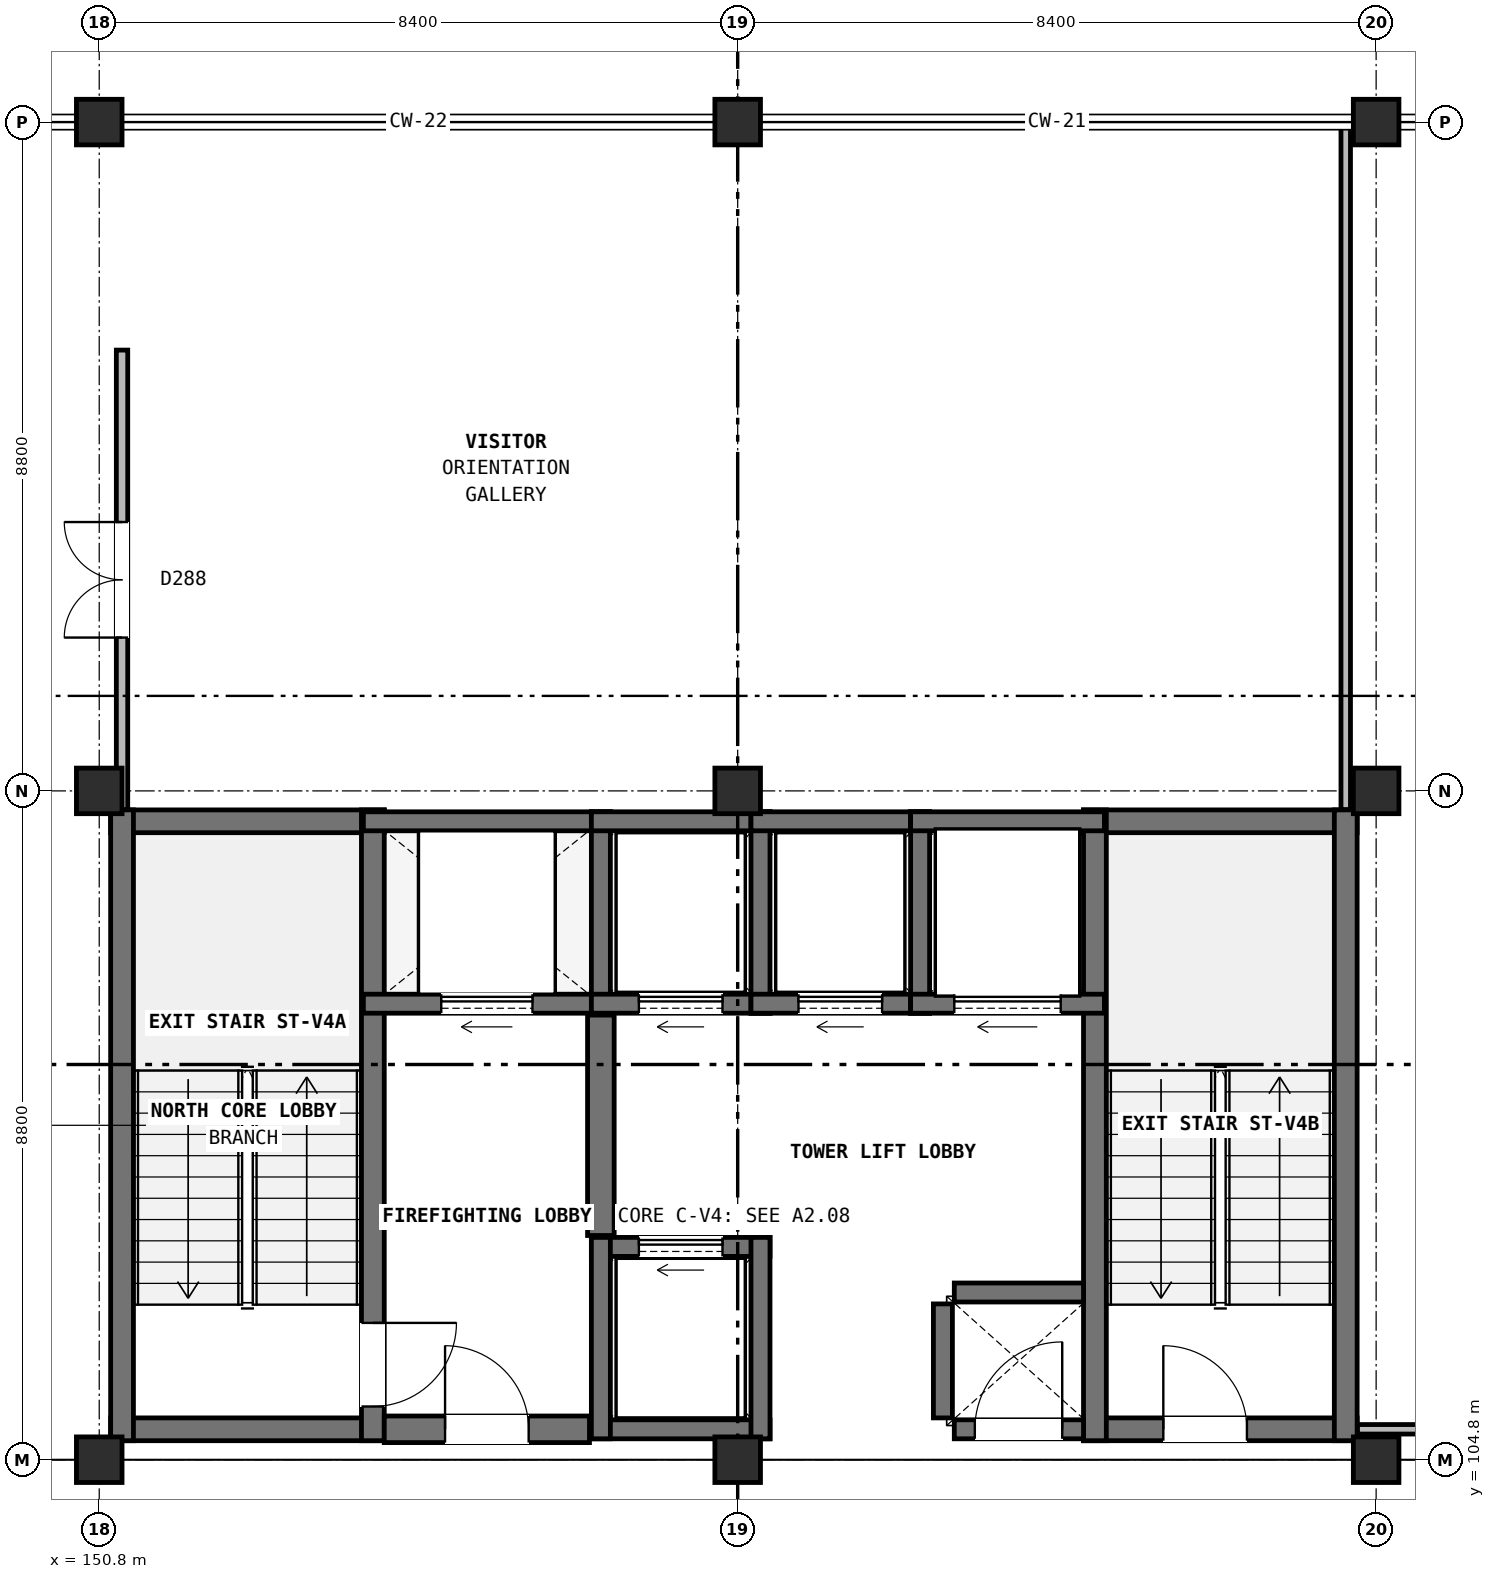
"""IFC4 building model, lengths in metres.
Left out: names, types, materials, properties, quantities, classifications, styles, units other than length and angle.
Written with IfcOpenShell. Run it as: python <this file> out.ifc"""

import sys

from ifc_helpers import new_model, si_unit, direction, frame, frame_2d, origin, origin_2d, place, context, subcontext, project, spatial, rectangle, extrude, element, fill, save


model = new_model("IFC4")
c1 = context("Model", 3, precision=1e-05, world=origin(), true_north=direction((0.0, 1.0)))
c2 = subcontext(c1, "Body", "Model", "MODEL_VIEW")
j1 = project(units=[si_unit("LENGTHUNIT", "METRE"), si_unit("PLANEANGLEUNIT", "RADIAN")], contexts=[c1])
p1 = place(None, origin())
s1 = spatial("IfcSite", under=j1, at=p1, CompositionType="ELEMENT")
p2 = place(p1, origin())
s2 = spatial("IfcBuilding", under=s1, at=p2, CompositionType="ELEMENT")
p3 = place(p2, frame((0.0, 0.0, 63.8)))
s3 = spatial("IfcBuildingStorey", under=s2, at=p3, CompositionType="ELEMENT", Elevation=63.8)
for number, where, z_axis, x_axis in (
    (1, (150.8, 104.8, 0.0), (0.0, 0.0, 1.0), (1.0, 0.0, 0.0)),
    (2, (150.8, 113.6, 0.0), (0.0, 0.0, 1.0), (1.0, 0.0, 0.0)),
    (3, (150.8, 122.4, 0.0), (0.0, 0.0, 1.0), (1.0, 0.0, 0.0)),
    (4, (159.2, 104.8, 0.0), (0.0, 0.0, 1.0), (1.0, 0.0, 0.0)),
    (5, (159.2, 113.6, 0.0), (0.0, 0.0, 1.0), (1.0, 0.0, 0.0)),
    (6, (159.2, 122.4, 0.0), (0.0, 0.0, 1.0), (1.0, 0.0, 0.0)),
    (7, (167.6, 104.8, 0.0), (0.0, 0.0, 1.0), (1.0, 0.0, 0.0)),
    (8, (167.6, 113.6, 0.0), (0.0, 0.0, 1.0), (1.0, 0.0, 0.0)),
    (9, (167.6, 122.4, 0.0), (0.0, 0.0, 1.0), (1.0, 0.0, 0.0)),
):
    element("IfcColumn", number, at=place(p3, frame(where, z_axis=z_axis, x_axis=x_axis)), inside=s3, PredefinedType="COLUMN", context=c2, shape_type="SweptSolid", body=[
        extrude(rectangle(XDim=0.6, YDim=0.6, at=origin_2d()), origin(), (0.0, 0.0, 1.0), 4.2),
    ])
for number, where, z_axis, x_axis in (
    (10, (150.95, 105.2, 0.0), (0.0, 0.0, 1.0), (1.0, 0.0, 0.0)),
    (11, (150.95, 113.2, 0.0), (0.0, 0.0, 1.0), (1.0, 0.0, 0.0)),
):
    element("IfcWall", number, at=place(p3, frame(where, z_axis=z_axis, x_axis=x_axis)), inside=s3, PredefinedType="SHEAR", context=c2, shape_type="SweptSolid", body=[
        extrude(rectangle(XDim=3.6, YDim=0.3, at=frame_2d((1.8, 0.0))), origin(), (0.0, 0.0, 1.0), 4.2),
    ])
p4 = place(p3, frame((151.1, 105.05, 0.0), z_axis=(0.0, 0.0, 1.0), x_axis=(0.0, 1.0, 0.0)))
e12 = element("IfcWall", 12, at=p4, inside=s3, PredefinedType="SHEAR", context=c2, shape_type="SweptSolid", body=[
    extrude(rectangle(XDim=8.3, YDim=0.3, at=frame_2d((4.15, 0.0))), origin(), (0.0, 0.0, 1.0), 4.2),
])
p5 = place(p3, frame((154.4, 105.05, 0.0), z_axis=(0.0, 0.0, 1.0), x_axis=(0.0, 1.0, 0.0)))
e13 = element("IfcWall", 13, at=p5, inside=s3, PredefinedType="SHEAR", context=c2, shape_type="SweptSolid", body=[
    extrude(rectangle(XDim=8.3, YDim=0.3, at=frame_2d((4.15, 0.0))), origin(), (0.0, 0.0, 1.0), 4.2),
])
p6 = place(p5, frame((0.45, 0.0, 0.0)))
e14 = element("IfcOpeningElement", 14, at=p6, cuts=e13, PredefinedType="OPENING", context=c2, shape_type="SweptSolid", body=[
    extrude(rectangle(XDim=1.1, YDim=2.2, at=frame_2d((0.55, 1.1))), frame((0.0, 0.16, 0.0), z_axis=(0.0, -1.0, 0.0), x_axis=(1.0, 0.0, 0.0)), (0.0, 0.0, 1.0), 0.32),
])
p7 = place(p3, frame((163.75, 105.2, 0.0), z_axis=(0.0, 0.0, 1.0), x_axis=(1.0, 0.0, 0.0)))
e15 = element("IfcWall", 15, at=p7, inside=s3, PredefinedType="SHEAR", context=c2, shape_type="SweptSolid", body=[
    extrude(rectangle(XDim=3.6, YDim=0.3, at=frame_2d((1.8, 0.0))), origin(), (0.0, 0.0, 1.0), 4.2),
])
p8 = place(p7, frame((1.05, 0.0, 0.0)))
e16 = element("IfcOpeningElement", 16, at=p8, cuts=e15, PredefinedType="OPENING", context=c2, shape_type="SweptSolid", body=[
    extrude(rectangle(XDim=1.1, YDim=2.2, at=frame_2d((0.55, 1.1))), frame((0.0, 0.16, 0.0), z_axis=(0.0, -1.0, 0.0), x_axis=(1.0, 0.0, 0.0)), (0.0, 0.0, 1.0), 0.32),
])
p9 = place(p3, frame((163.75, 113.2, 0.0), z_axis=(0.0, 0.0, 1.0), x_axis=(1.0, 0.0, 0.0)))
e17 = element("IfcWall", 17, at=p9, inside=s3, PredefinedType="SHEAR", context=c2, shape_type="SweptSolid", body=[
    extrude(rectangle(XDim=3.6, YDim=0.3, at=frame_2d((1.8, 0.0))), origin(), (0.0, 0.0, 1.0), 4.2),
])
for number, where, z_axis, x_axis in (
    (18, (163.9, 105.05, 0.0), (0.0, 0.0, 1.0), (0.0, 1.0, 0.0)),
    (19, (167.2, 105.05, 0.0), (0.0, 0.0, 1.0), (0.0, 1.0, 0.0)),
):
    element("IfcWall", number, at=place(p3, frame(where, z_axis=z_axis, x_axis=x_axis)), inside=s3, PredefinedType="SHEAR", context=c2, shape_type="SweptSolid", body=[
        extrude(rectangle(XDim=8.3, YDim=0.3, at=frame_2d((4.15, 0.0))), origin(), (0.0, 0.0, 1.0), 4.2),
    ])
p10 = place(p3, frame((154.275, 110.8, 0.0), z_axis=(0.0, 0.0, 1.0), x_axis=(1.0, 0.0, 0.0)))
e20 = element("IfcWall", 20, at=p10, inside=s3, PredefinedType="SOLIDWALL", context=c2, shape_type="SweptSolid", body=[
    extrude(rectangle(XDim=3.25, YDim=0.25, at=frame_2d((1.625, 0.0))), origin(), (0.0, 0.0, 1.0), 3.88),
])
p11 = place(p10, frame((1.025, 0.0, 0.0)))
e21 = element("IfcOpeningElement", 21, at=p11, cuts=e20, PredefinedType="OPENING", context=c2, shape_type="SweptSolid", body=[
    extrude(rectangle(XDim=1.2, YDim=2.2, at=frame_2d((0.6, 1.1))), frame((0.0, 0.135, 0.0), z_axis=(0.0, -1.0, 0.0), x_axis=(1.0, 0.0, 0.0)), (0.0, 0.0, 1.0), 0.27),
])
p12 = place(p3, frame((154.275, 113.2, 0.0), z_axis=(0.0, 0.0, 1.0), x_axis=(1.0, 0.0, 0.0)))
e22 = element("IfcWall", 22, at=p12, inside=s3, PredefinedType="SOLIDWALL", context=c2, shape_type="SweptSolid", body=[
    extrude(rectangle(XDim=3.25, YDim=0.25, at=frame_2d((1.625, 0.0))), origin(), (0.0, 0.0, 1.0), 3.88),
])
p13 = place(p3, frame((157.4, 110.675, 0.0), z_axis=(0.0, 0.0, 1.0), x_axis=(0.0, 1.0, 0.0)))
e23 = element("IfcWall", 23, at=p13, inside=s3, PredefinedType="SOLIDWALL", context=c2, shape_type="SweptSolid", body=[
    extrude(rectangle(XDim=2.65, YDim=0.25, at=frame_2d((1.325, 0.0))), origin(), (0.0, 0.0, 1.0), 3.88),
])
p14 = place(p3, frame((157.275, 110.8, 0.0), z_axis=(0.0, 0.0, 1.0), x_axis=(1.0, 0.0, 0.0)))
e24 = element("IfcWall", 24, at=p14, inside=s3, PredefinedType="SOLIDWALL", context=c2, shape_type="SweptSolid", body=[
    extrude(rectangle(XDim=2.35, YDim=0.25, at=frame_2d((1.175, 0.0))), origin(), (0.0, 0.0, 1.0), 3.88),
])
p15 = place(p14, frame((0.625, 0.0, 0.0)))
e25 = element("IfcOpeningElement", 25, at=p15, cuts=e24, PredefinedType="OPENING", context=c2, shape_type="SweptSolid", body=[
    extrude(rectangle(XDim=1.1, YDim=2.2, at=frame_2d((0.55, 1.1))), frame((0.0, 0.135, 0.0), z_axis=(0.0, -1.0, 0.0), x_axis=(1.0, 0.0, 0.0)), (0.0, 0.0, 1.0), 0.27),
])
p16 = place(p3, frame((157.275, 113.2, 0.0), z_axis=(0.0, 0.0, 1.0), x_axis=(1.0, 0.0, 0.0)))
e26 = element("IfcWall", 26, at=p16, inside=s3, PredefinedType="SOLIDWALL", context=c2, shape_type="SweptSolid", body=[
    extrude(rectangle(XDim=2.35, YDim=0.25, at=frame_2d((1.175, 0.0))), origin(), (0.0, 0.0, 1.0), 3.88),
])
p17 = place(p3, frame((159.5, 110.675, 0.0), z_axis=(0.0, 0.0, 1.0), x_axis=(0.0, 1.0, 0.0)))
e27 = element("IfcWall", 27, at=p17, inside=s3, PredefinedType="SOLIDWALL", context=c2, shape_type="SweptSolid", body=[
    extrude(rectangle(XDim=2.65, YDim=0.25, at=frame_2d((1.325, 0.0))), origin(), (0.0, 0.0, 1.0), 3.88),
])
p18 = place(p3, frame((159.375, 110.8, 0.0), z_axis=(0.0, 0.0, 1.0), x_axis=(1.0, 0.0, 0.0)))
e28 = element("IfcWall", 28, at=p18, inside=s3, PredefinedType="SOLIDWALL", context=c2, shape_type="SweptSolid", body=[
    extrude(rectangle(XDim=2.35, YDim=0.25, at=frame_2d((1.175, 0.0))), origin(), (0.0, 0.0, 1.0), 3.88),
])
p19 = place(p18, frame((0.625, 0.0, 0.0)))
e29 = element("IfcOpeningElement", 29, at=p19, cuts=e28, PredefinedType="OPENING", context=c2, shape_type="SweptSolid", body=[
    extrude(rectangle(XDim=1.1, YDim=2.2, at=frame_2d((0.55, 1.1))), frame((0.0, 0.135, 0.0), z_axis=(0.0, -1.0, 0.0), x_axis=(1.0, 0.0, 0.0)), (0.0, 0.0, 1.0), 0.27),
])
p20 = place(p3, frame((159.375, 113.2, 0.0), z_axis=(0.0, 0.0, 1.0), x_axis=(1.0, 0.0, 0.0)))
e30 = element("IfcWall", 30, at=p20, inside=s3, PredefinedType="SOLIDWALL", context=c2, shape_type="SweptSolid", body=[
    extrude(rectangle(XDim=2.35, YDim=0.25, at=frame_2d((1.175, 0.0))), origin(), (0.0, 0.0, 1.0), 3.88),
])
p21 = place(p3, frame((161.6, 110.675, 0.0), z_axis=(0.0, 0.0, 1.0), x_axis=(0.0, 1.0, 0.0)))
e31 = element("IfcWall", 31, at=p21, inside=s3, PredefinedType="SOLIDWALL", context=c2, shape_type="SweptSolid", body=[
    extrude(rectangle(XDim=2.65, YDim=0.25, at=frame_2d((1.325, 0.0))), origin(), (0.0, 0.0, 1.0), 3.88),
])
p22 = place(p3, frame((157.275, 105.2, 0.0), z_axis=(0.0, 0.0, 1.0), x_axis=(1.0, 0.0, 0.0)))
e32 = element("IfcWall", 32, at=p22, inside=s3, PredefinedType="SOLIDWALL", context=c2, shape_type="SweptSolid", body=[
    extrude(rectangle(XDim=2.35, YDim=0.25, at=frame_2d((1.175, 0.0))), origin(), (0.0, 0.0, 1.0), 3.88),
])
p23 = place(p3, frame((157.275, 107.6, 0.0), z_axis=(0.0, 0.0, 1.0), x_axis=(1.0, 0.0, 0.0)))
e33 = element("IfcWall", 33, at=p23, inside=s3, PredefinedType="SOLIDWALL", context=c2, shape_type="SweptSolid", body=[
    extrude(rectangle(XDim=2.35, YDim=0.25, at=frame_2d((1.175, 0.0))), origin(), (0.0, 0.0, 1.0), 3.88),
])
p24 = place(p23, frame((0.625, 0.0, 0.0)))
e34 = element("IfcOpeningElement", 34, at=p24, cuts=e33, PredefinedType="OPENING", context=c2, shape_type="SweptSolid", body=[
    extrude(rectangle(XDim=1.1, YDim=2.2, at=frame_2d((0.55, 1.1))), frame((0.0, 0.135, 0.0), z_axis=(0.0, -1.0, 0.0), x_axis=(1.0, 0.0, 0.0)), (0.0, 0.0, 1.0), 0.27),
])
for number, where, z_axis, x_axis in (
    (35, (157.4, 105.075, 0.0), (0.0, 0.0, 1.0), (0.0, 1.0, 0.0)),
    (36, (159.5, 105.075, 0.0), (0.0, 0.0, 1.0), (0.0, 1.0, 0.0)),
):
    element("IfcWall", number, at=place(p3, frame(where, z_axis=z_axis, x_axis=x_axis)), inside=s3, PredefinedType="SOLIDWALL", context=c2, shape_type="SweptSolid", body=[
        extrude(rectangle(XDim=2.65, YDim=0.25, at=frame_2d((1.325, 0.0))), origin(), (0.0, 0.0, 1.0), 3.88),
    ])
p25 = place(p3, frame((161.475, 110.8, 0.0), z_axis=(0.0, 0.0, 1.0), x_axis=(1.0, 0.0, 0.0)))
e37 = element("IfcWall", 37, at=p25, inside=s3, PredefinedType="SOLIDWALL", context=c2, shape_type="SweptSolid", body=[
    extrude(rectangle(XDim=2.55, YDim=0.25, at=frame_2d((1.275, 0.0))), origin(), (0.0, 0.0, 1.0), 3.88),
])
p26 = place(p25, frame((0.575, 0.0, 0.0)))
e38 = element("IfcOpeningElement", 38, at=p26, cuts=e37, PredefinedType="OPENING", context=c2, shape_type="SweptSolid", body=[
    extrude(rectangle(XDim=1.4, YDim=2.3, at=frame_2d((0.7, 1.15))), frame((0.0, 0.135, 0.0), z_axis=(0.0, -1.0, 0.0), x_axis=(1.0, 0.0, 0.0)), (0.0, 0.0, 1.0), 0.27),
])
p27 = place(p3, frame((161.475, 113.2, 0.0), z_axis=(0.0, 0.0, 1.0), x_axis=(1.0, 0.0, 0.0)))
e39 = element("IfcWall", 39, at=p27, inside=s3, PredefinedType="SOLIDWALL", context=c2, shape_type="SweptSolid", body=[
    extrude(rectangle(XDim=2.55, YDim=0.25, at=frame_2d((1.275, 0.0))), origin(), (0.0, 0.0, 1.0), 3.88),
])
p28 = place(p3, frame((157.4, 107.75, 0.0), z_axis=(0.0, 0.0, 1.0), x_axis=(0.0, 1.0, 0.0)))
e40 = element("IfcWall", 40, at=p28, inside=s3, PredefinedType="SHEAR", context=c2, shape_type="SweptSolid", body=[
    extrude(rectangle(XDim=2.9, YDim=0.35, at=frame_2d((1.45, 0.0))), origin(), (0.0, 0.0, 1.0), 3.88),
])
p29 = place(p3, frame((154.55, 105.2, 0.0), z_axis=(0.0, 0.0, 1.0), x_axis=(1.0, 0.0, 0.0)))
e41 = element("IfcWall", 41, at=p29, inside=s3, PredefinedType="SHEAR", context=c2, shape_type="SweptSolid", body=[
    extrude(rectangle(XDim=2.7, YDim=0.35, at=frame_2d((1.35, 0.0))), origin(), (0.0, 0.0, 1.0), 3.88),
])
p30 = place(p29, frame((0.8, 0.0, 0.0)))
e42 = element("IfcOpeningElement", 42, at=p30, cuts=e41, PredefinedType="OPENING", context=c2, shape_type="SweptSolid", body=[
    extrude(rectangle(XDim=1.1, YDim=2.2, at=frame_2d((0.55, 1.1))), frame((0.0, 0.185, 0.0), z_axis=(0.0, -1.0, 0.0), x_axis=(1.0, 0.0, 0.0)), (0.0, 0.0, 1.0), 0.37),
])
p31 = place(p3, frame((161.9, 105.35, 0.0), z_axis=(0.0, 0.0, 1.0), x_axis=(0.0, 1.0, 0.0)))
e43 = element("IfcWall", 43, at=p31, inside=s3, PredefinedType="SOLIDWALL", context=c2, shape_type="SweptSolid", body=[
    extrude(rectangle(XDim=1.5, YDim=0.25, at=frame_2d((0.75, 0.0))), origin(), (0.0, 0.0, 1.0), 3.88),
])
p32 = place(p3, frame((162.05, 107.0, 0.0), z_axis=(0.0, 0.0, 1.0), x_axis=(1.0, 0.0, 0.0)))
e44 = element("IfcWall", 44, at=p32, inside=s3, PredefinedType="SOLIDWALL", context=c2, shape_type="SweptSolid", body=[
    extrude(rectangle(XDim=1.7, YDim=0.25, at=frame_2d((0.85, 0.0))), origin(), (0.0, 0.0, 1.0), 3.88),
])
p33 = place(p3, frame((162.05, 105.2, 0.0), z_axis=(0.0, 0.0, 1.0), x_axis=(1.0, 0.0, 0.0)))
e45 = element("IfcWall", 45, at=p33, inside=s3, PredefinedType="SOLIDWALL", context=c2, shape_type="SweptSolid", body=[
    extrude(rectangle(XDim=1.7, YDim=0.25, at=frame_2d((0.85, 0.0))), origin(), (0.0, 0.0, 1.0), 3.88),
])
p34 = place(p33, frame((0.27, 0.0, 0.0)))
e46 = element("IfcOpeningElement", 46, at=p34, cuts=e45, PredefinedType="OPENING", context=c2, shape_type="SweptSolid", body=[
    extrude(rectangle(XDim=1.15, YDim=2.2, at=frame_2d((0.575, 1.1))), frame((0.0, 0.135, 0.0), z_axis=(0.0, -1.0, 0.0), x_axis=(1.0, 0.0, 0.0)), (0.0, 0.0, 1.0), 0.27),
])
p35 = place(p3, frame((167.355, 105.2, 0.0), z_axis=(0.0, 0.0, 1.0), x_axis=(1.0, 0.0, 0.0)))
e47 = element("IfcWall", 47, at=p35, inside=s3, PredefinedType="PARTITIONING", context=c2, shape_type="SweptSolid", body=[
    extrude(rectangle(XDim=4.245, YDim=0.125, at=frame_2d((2.123, 0.0))), origin(), (0.0, 0.0, 1.0), 3.445),
])
p36 = place(p35, frame((1.633, 0.0, 0.0)))
e48 = element("IfcOpeningElement", 48, at=p36, cuts=e47, PredefinedType="OPENING", context=c2, shape_type="SweptSolid", body=[
    extrude(rectangle(XDim=0.98, YDim=2.1, at=frame_2d((0.49, 1.05))), frame((0.0, 0.073, 0.0), z_axis=(0.0, -1.0, 0.0), x_axis=(1.0, 0.0, 0.0)), (0.0, 0.0, 1.0), 0.145),
])
p37 = place(p3, frame((151.1, 113.355, 0.0), z_axis=(0.0, 0.0, 1.0), x_axis=(0.0, 1.0, 0.0)))
e49 = element("IfcWall", 49, at=p37, inside=s3, PredefinedType="PARTITIONING", context=c2, shape_type="SweptSolid", body=[
    extrude(rectangle(XDim=6.045, YDim=0.15, at=frame_2d((3.022, 0.0))), origin(), (0.0, 0.0, 1.0), 3.445),
])
p38 = place(p37, frame((2.262, 0.0, 0.0)))
e50 = element("IfcOpeningElement", 50, at=p38, cuts=e49, PredefinedType="OPENING", context=c2, shape_type="SweptSolid", body=[
    extrude(rectangle(XDim=1.52, YDim=2.28, at=frame_2d((0.76, 1.14))), frame((0.0, 0.085, 0.0), z_axis=(0.0, -1.0, 0.0), x_axis=(1.0, 0.0, 0.0)), (0.0, 0.0, 1.0), 0.17),
])
p39 = place(p3, frame((167.2, 113.355, 0.0), z_axis=(0.0, 0.0, 1.0), x_axis=(0.0, 1.0, 0.0)))
e51 = element("IfcWall", 51, at=p39, inside=s3, PredefinedType="PARTITIONING", context=c2, shape_type="SweptSolid", body=[
    extrude(rectangle(XDim=9.045, YDim=0.125, at=frame_2d((4.522, 0.0))), origin(), (0.0, 0.0, 1.0), 3.445),
])
p40 = place(p6, frame((1.1, 0.0, 0.0), z_axis=(0.0, 0.0, 1.0), x_axis=(-1.0, 0.0, 0.0)))
e52 = element("IfcDoor", 52, at=p40, inside=s3, OperationType="SINGLE_SWING_RIGHT", PredefinedType="DOOR", context=c2, shape_type="SweptSolid", body=[
    extrude(rectangle(XDim=1.1, YDim=2.2, at=frame_2d((0.55, 1.1))), frame((0.0, 0.025, 0.0), z_axis=(0.0, -1.0, 0.0), x_axis=(1.0, 0.0, 0.0)), (0.0, 0.0, 1.0), 0.05),
])
fill(e14, e52)
p41 = place(p8, origin())
e53 = element("IfcDoor", 53, at=p41, inside=s3, OperationType="SINGLE_SWING_LEFT", PredefinedType="DOOR", context=c2, shape_type="SweptSolid", body=[
    extrude(rectangle(XDim=1.1, YDim=2.2, at=frame_2d((0.55, 1.1))), frame((0.0, 0.025, 0.0), z_axis=(0.0, -1.0, 0.0), x_axis=(1.0, 0.0, 0.0)), (0.0, 0.0, 1.0), 0.05),
])
fill(e16, e53)
p42 = place(p11, origin())
e54 = element("IfcDoor", 54, at=p42, inside=s3, OperationType="SLIDING_TO_LEFT", PredefinedType="DOOR", context=c2, shape_type="SweptSolid", body=[
    extrude(rectangle(XDim=1.2, YDim=2.2, at=frame_2d((0.6, 1.1))), frame((0.0, 0.025, 0.0), z_axis=(0.0, -1.0, 0.0), x_axis=(1.0, 0.0, 0.0)), (0.0, 0.0, 1.0), 0.05),
])
fill(e21, e54)
p43 = place(p15, origin())
e55 = element("IfcDoor", 55, at=p43, inside=s3, OperationType="SLIDING_TO_LEFT", PredefinedType="DOOR", context=c2, shape_type="SweptSolid", body=[
    extrude(rectangle(XDim=1.1, YDim=2.2, at=frame_2d((0.55, 1.1))), frame((0.0, 0.025, 0.0), z_axis=(0.0, -1.0, 0.0), x_axis=(1.0, 0.0, 0.0)), (0.0, 0.0, 1.0), 0.05),
])
fill(e25, e55)
p44 = place(p19, origin())
e56 = element("IfcDoor", 56, at=p44, inside=s3, OperationType="SLIDING_TO_LEFT", PredefinedType="DOOR", context=c2, shape_type="SweptSolid", body=[
    extrude(rectangle(XDim=1.1, YDim=2.2, at=frame_2d((0.55, 1.1))), frame((0.0, 0.025, 0.0), z_axis=(0.0, -1.0, 0.0), x_axis=(1.0, 0.0, 0.0)), (0.0, 0.0, 1.0), 0.05),
])
fill(e29, e56)
p45 = place(p24, origin())
e57 = element("IfcDoor", 57, at=p45, inside=s3, OperationType="SLIDING_TO_LEFT", PredefinedType="DOOR", context=c2, shape_type="SweptSolid", body=[
    extrude(rectangle(XDim=1.1, YDim=2.2, at=frame_2d((0.55, 1.1))), frame((0.0, 0.025, 0.0), z_axis=(0.0, -1.0, 0.0), x_axis=(1.0, 0.0, 0.0)), (0.0, 0.0, 1.0), 0.05),
])
fill(e34, e57)
p46 = place(p26, origin())
e58 = element("IfcDoor", 58, at=p46, inside=s3, OperationType="SLIDING_TO_LEFT", PredefinedType="DOOR", context=c2, shape_type="SweptSolid", body=[
    extrude(rectangle(XDim=1.4, YDim=2.3, at=frame_2d((0.7, 1.15))), frame((0.0, 0.025, 0.0), z_axis=(0.0, -1.0, 0.0), x_axis=(1.0, 0.0, 0.0)), (0.0, 0.0, 1.0), 0.05),
])
fill(e38, e58)
p47 = place(p30, origin())
e59 = element("IfcDoor", 59, at=p47, inside=s3, OperationType="SINGLE_SWING_LEFT", PredefinedType="DOOR", context=c2, shape_type="SweptSolid", body=[
    extrude(rectangle(XDim=1.1, YDim=2.2, at=frame_2d((0.55, 1.1))), frame((0.0, 0.025, 0.0), z_axis=(0.0, -1.0, 0.0), x_axis=(1.0, 0.0, 0.0)), (0.0, 0.0, 1.0), 0.05),
])
fill(e42, e59)
p48 = place(p34, origin())
e60 = element("IfcDoor", 60, at=p48, inside=s3, OperationType="SINGLE_SWING_RIGHT", PredefinedType="DOOR", context=c2, shape_type="SweptSolid", body=[
    extrude(rectangle(XDim=1.15, YDim=2.2, at=frame_2d((0.575, 1.1))), frame((0.0, 0.025, 0.0), z_axis=(0.0, -1.0, 0.0), x_axis=(1.0, 0.0, 0.0)), (0.0, 0.0, 1.0), 0.05),
])
fill(e46, e60)
p49 = place(p38, origin())
e61 = element("IfcDoor", 61, at=p49, inside=s3, OperationType="DOUBLE_DOOR_SINGLE_SWING", PredefinedType="DOOR", context=c2, shape_type="SweptSolid", body=[
    extrude(rectangle(XDim=1.52, YDim=2.28, at=frame_2d((0.76, 1.14))), frame((0.0, 0.025, 0.0), z_axis=(0.0, -1.0, 0.0), x_axis=(1.0, 0.0, 0.0)), (0.0, 0.0, 1.0), 0.05),
])
fill(e50, e61)
save(model, sys.argv[1])
